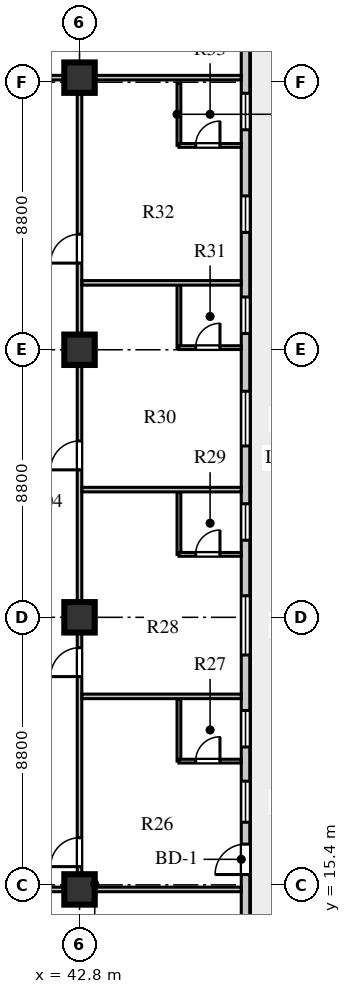
"""IFC4 building model, lengths in metres.
Left out: names, types, materials, properties, quantities, classifications, styles, units other than length and angle.
Written with IfcOpenShell. Run it as: python <this file> out.ifc"""

import sys

from ifc_helpers import new_model, si_unit, direction, frame, frame_2d, origin, origin_2d, place, context, subcontext, project, spatial, rectangle, extrude, element, fill, save


model = new_model("IFC4")
c1 = context("Model", 3, precision=1e-05, world=origin(), true_north=direction((0.0, 1.0)))
c2 = subcontext(c1, "Body", "Model", "MODEL_VIEW")
j1 = project(units=[si_unit("LENGTHUNIT", "METRE"), si_unit("PLANEANGLEUNIT", "RADIAN")], contexts=[c1])
p1 = place(None, origin())
s1 = spatial("IfcSite", under=j1, at=p1, CompositionType="ELEMENT")
p2 = place(p1, origin())
s2 = spatial("IfcBuilding", under=s1, at=p2, CompositionType="ELEMENT")
p3 = place(p2, frame((0.0, 0.0, 127.1)))
s3 = spatial("IfcBuildingStorey", under=s2, at=p3, CompositionType="ELEMENT", Elevation=127.1)
for number, where, z_axis, x_axis in (
    (1, (42.8, 15.25, 0.0), (0.0, 0.0, 1.0), (1.0, 0.0, 0.0)),
    (2, (42.8, 24.2, 0.0), (0.0, 0.0, 1.0), (1.0, 0.0, 0.0)),
    (3, (42.8, 33.0, 0.0), (0.0, 0.0, 1.0), (1.0, 0.0, 0.0)),
    (4, (42.8, 41.95, 0.0), (0.0, 0.0, 1.0), (1.0, 0.0, 0.0)),
):
    element("IfcColumn", number, at=place(p3, frame(where, z_axis=z_axis, x_axis=x_axis)), inside=s3, PredefinedType="COLUMN", context=c2, shape_type="SweptSolid", body=[
        extrude(rectangle(XDim=1.0, YDim=1.0, at=origin_2d()), origin(), (0.0, 0.0, 1.0), 3.6),
    ])
p4 = place(p3, frame((48.26, 13.33, 0.0), z_axis=(0.0, 0.0, 1.0), x_axis=(0.0, 1.0, 0.0)))
e5 = element("IfcWall", 5, at=p4, inside=s3, PredefinedType="STANDARD", context=c2, shape_type="SweptSolid", body=[
    extrude(rectangle(XDim=30.54, YDim=0.28, at=frame_2d((15.27, 0.0))), origin(), (0.0, 0.0, 1.0), 3.6),
])
p5 = place(p4, frame((2.41, 0.0, 0.0)))
e6 = element("IfcOpeningElement", 6, at=p5, cuts=e5, PredefinedType="OPENING", context=c2, shape_type="SweptSolid", body=[
    extrude(rectangle(XDim=1.0, YDim=2.05, at=frame_2d((0.5, 1.025))), frame((0.0, 0.15, 0.0), z_axis=(0.0, -1.0, 0.0), x_axis=(1.0, 0.0, 0.0)), (0.0, 0.0, 1.0), 0.3),
])
p6 = place(p4, frame((4.13, 0.0, 0.8)))
e7 = element("IfcOpeningElement", 7, at=p6, cuts=e5, PredefinedType="OPENING", context=c2, shape_type="SweptSolid", body=[
    extrude(rectangle(XDim=1.35, YDim=1.9, at=frame_2d((0.675, 0.95))), frame((0.0, 0.15, 0.0), z_axis=(0.0, -1.0, 0.0), x_axis=(1.0, 0.0, 0.0)), (0.0, 0.0, 1.0), 0.3),
])
p7 = place(p4, frame((6.605, 0.0, 0.8)))
e8 = element("IfcOpeningElement", 8, at=p7, cuts=e5, PredefinedType="OPENING", context=c2, shape_type="SweptSolid", body=[
    extrude(rectangle(XDim=1.2, YDim=1.75, at=frame_2d((0.6, 0.875))), frame((0.0, 0.15, 0.0), z_axis=(0.0, -1.0, 0.0), x_axis=(1.0, 0.0, 0.0)), (0.0, 0.0, 1.0), 0.3),
])
p8 = place(p4, frame((9.63, 0.0, 0.8)))
e9 = element("IfcOpeningElement", 9, at=p8, cuts=e5, PredefinedType="OPENING", context=c2, shape_type="SweptSolid", body=[
    extrude(rectangle(XDim=1.95, YDim=2.0, at=frame_2d((0.975, 1.0))), frame((0.0, 0.15, 0.0), z_axis=(0.0, -1.0, 0.0), x_axis=(1.0, 0.0, 0.0)), (0.0, 0.0, 1.0), 0.3),
])
p9 = place(p4, frame((13.405, 0.0, 0.8)))
e10 = element("IfcOpeningElement", 10, at=p9, cuts=e5, PredefinedType="OPENING", context=c2, shape_type="SweptSolid", body=[
    extrude(rectangle(XDim=1.2, YDim=1.75, at=frame_2d((0.6, 0.875))), frame((0.0, 0.15, 0.0), z_axis=(0.0, -1.0, 0.0), x_axis=(1.0, 0.0, 0.0)), (0.0, 0.0, 1.0), 0.3),
])
p10 = place(p4, frame((16.505, 0.0, 0.8)))
e11 = element("IfcOpeningElement", 11, at=p10, cuts=e5, PredefinedType="OPENING", context=c2, shape_type="SweptSolid", body=[
    extrude(rectangle(XDim=1.8, YDim=2.0, at=frame_2d((0.9, 1.0))), frame((0.0, 0.15, 0.0), z_axis=(0.0, -1.0, 0.0), x_axis=(1.0, 0.0, 0.0)), (0.0, 0.0, 1.0), 0.3),
])
p11 = place(p4, frame((20.205, 0.0, 0.8)))
e12 = element("IfcOpeningElement", 12, at=p11, cuts=e5, PredefinedType="OPENING", context=c2, shape_type="SweptSolid", body=[
    extrude(rectangle(XDim=1.2, YDim=1.75, at=frame_2d((0.6, 0.875))), frame((0.0, 0.15, 0.0), z_axis=(0.0, -1.0, 0.0), x_axis=(1.0, 0.0, 0.0)), (0.0, 0.0, 1.0), 0.3),
])
p12 = place(p4, frame((23.53, 0.0, 0.8)))
e13 = element("IfcOpeningElement", 13, at=p12, cuts=e5, PredefinedType="OPENING", context=c2, shape_type="SweptSolid", body=[
    extrude(rectangle(XDim=1.2, YDim=1.75, at=frame_2d((0.6, 0.875))), frame((0.0, 0.15, 0.0), z_axis=(0.0, -1.0, 0.0), x_axis=(1.0, 0.0, 0.0)), (0.0, 0.0, 1.0), 0.3),
])
p13 = place(p4, frame((26.905, 0.0, 0.8)))
e14 = element("IfcOpeningElement", 14, at=p13, cuts=e5, PredefinedType="OPENING", context=c2, shape_type="SweptSolid", body=[
    extrude(rectangle(XDim=1.2, YDim=1.75, at=frame_2d((0.6, 0.875))), frame((0.0, 0.15, 0.0), z_axis=(0.0, -1.0, 0.0), x_axis=(1.0, 0.0, 0.0)), (0.0, 0.0, 1.0), 0.3),
])
p14 = place(p3, frame((42.8, 15.25, 0.0), z_axis=(0.0, 0.0, 1.0), x_axis=(0.0, 1.0, 0.0)))
e15 = element("IfcWall", 15, at=p14, inside=s3, PredefinedType="PARTITIONING", context=c2, shape_type="SweptSolid", body=[
    extrude(rectangle(XDim=26.7, YDim=0.15, at=frame_2d((13.35, 0.0))), origin(), (0.0, 0.0, 1.0), 2.95),
])
p15 = place(p14, frame((0.75, 0.0, 0.0)))
e16 = element("IfcOpeningElement", 16, at=p15, cuts=e15, PredefinedType="OPENING", context=c2, shape_type="SweptSolid", body=[
    extrude(rectangle(XDim=0.95, YDim=2.1, at=frame_2d((0.475, 1.05))), frame((0.0, 0.085, 0.0), z_axis=(0.0, -1.0, 0.0), x_axis=(1.0, 0.0, 0.0)), (0.0, 0.0, 1.0), 0.17),
])
p16 = place(p14, frame((7.0, 0.0, 0.0)))
e17 = element("IfcOpeningElement", 17, at=p16, cuts=e15, PredefinedType="OPENING", context=c2, shape_type="SweptSolid", body=[
    extrude(rectangle(XDim=0.95, YDim=2.1, at=frame_2d((0.475, 1.05))), frame((0.0, 0.085, 0.0), z_axis=(0.0, -1.0, 0.0), x_axis=(1.0, 0.0, 0.0)), (0.0, 0.0, 1.0), 0.17),
])
p17 = place(p14, frame((13.8, 0.0, 0.0)))
e18 = element("IfcOpeningElement", 18, at=p17, cuts=e15, PredefinedType="OPENING", context=c2, shape_type="SweptSolid", body=[
    extrude(rectangle(XDim=0.95, YDim=2.1, at=frame_2d((0.475, 1.05))), frame((0.0, 0.085, 0.0), z_axis=(0.0, -1.0, 0.0), x_axis=(1.0, 0.0, 0.0)), (0.0, 0.0, 1.0), 0.17),
])
p18 = place(p14, frame((20.6, 0.0, 0.0)))
e19 = element("IfcOpeningElement", 19, at=p18, cuts=e15, PredefinedType="OPENING", context=c2, shape_type="SweptSolid", body=[
    extrude(rectangle(XDim=0.95, YDim=2.1, at=frame_2d((0.475, 1.05))), frame((0.0, 0.085, 0.0), z_axis=(0.0, -1.0, 0.0), x_axis=(1.0, 0.0, 0.0)), (0.0, 0.0, 1.0), 0.17),
])
for number, where, z_axis, x_axis in (
    (20, (40.82, 15.25, 0.0), (0.0, 0.0, 1.0), (1.0, 0.0, 0.0)),
    (21, (40.82, 41.95, 0.0), (0.0, 0.0, 1.0), (1.0, 0.0, 0.0)),
):
    element("IfcWall", number, at=place(p3, frame(where, z_axis=z_axis, x_axis=x_axis)), inside=s3, PredefinedType="PARTITIONING", context=c2, shape_type="SweptSolid", body=[
        extrude(rectangle(XDim=7.3, YDim=0.15, at=frame_2d((3.65, 0.0))), origin(), (0.0, 0.0, 1.0), 2.95),
    ])
p19 = place(p3, frame((46.07, 19.47, 0.0), z_axis=(0.0, 0.0, 1.0), x_axis=(0.0, 1.0, 0.0)))
e22 = element("IfcWall", 22, at=p19, inside=s3, PredefinedType="PLUMBINGWALL", context=c2, shape_type="SweptSolid", body=[
    extrude(rectangle(XDim=2.05, YDim=0.125, at=frame_2d((1.025, 0.0))), origin(), (0.0, 0.0, 1.0), 3.6),
])
p20 = place(p3, frame((46.07, 19.47, 0.0), z_axis=(0.0, 0.0, 1.0), x_axis=(1.0, 0.0, 0.0)))
e23 = element("IfcWall", 23, at=p20, inside=s3, PredefinedType="PLUMBINGWALL", context=c2, shape_type="SweptSolid", body=[
    extrude(rectangle(XDim=2.05, YDim=0.125, at=frame_2d((1.025, 0.0))), origin(), (0.0, 0.0, 1.0), 3.6),
])
p21 = place(p20, frame((0.55, 0.0, 0.0)))
e24 = element("IfcOpeningElement", 24, at=p21, cuts=e23, PredefinedType="OPENING", context=c2, shape_type="SweptSolid", body=[
    extrude(rectangle(XDim=0.8, YDim=2.05, at=frame_2d((0.4, 1.025))), frame((0.0, 0.073, 0.0), z_axis=(0.0, -1.0, 0.0), x_axis=(1.0, 0.0, 0.0)), (0.0, 0.0, 1.0), 0.145),
])
p22 = place(p3, frame((42.88, 21.6, 0.0), z_axis=(0.0, 0.0, 1.0), x_axis=(1.0, 0.0, 0.0)))
e25 = element("IfcWall", 25, at=p22, inside=s3, PredefinedType="PARTITIONING", context=c2, shape_type="SweptSolid", body=[
    extrude(rectangle(XDim=5.24, YDim=0.15, at=frame_2d((2.62, 0.0))), origin(), (0.0, 0.0, 1.0), 3.6),
])
p23 = place(p3, frame((46.07, 26.27, 0.0), z_axis=(0.0, 0.0, 1.0), x_axis=(0.0, 1.0, 0.0)))
e26 = element("IfcWall", 26, at=p23, inside=s3, PredefinedType="PLUMBINGWALL", context=c2, shape_type="SweptSolid", body=[
    extrude(rectangle(XDim=2.05, YDim=0.125, at=frame_2d((1.025, 0.0))), origin(), (0.0, 0.0, 1.0), 3.6),
])
p24 = place(p3, frame((46.07, 26.27, 0.0), z_axis=(0.0, 0.0, 1.0), x_axis=(1.0, 0.0, 0.0)))
e27 = element("IfcWall", 27, at=p24, inside=s3, PredefinedType="PLUMBINGWALL", context=c2, shape_type="SweptSolid", body=[
    extrude(rectangle(XDim=2.05, YDim=0.125, at=frame_2d((1.025, 0.0))), origin(), (0.0, 0.0, 1.0), 3.6),
])
p25 = place(p24, frame((0.55, 0.0, 0.0)))
e28 = element("IfcOpeningElement", 28, at=p25, cuts=e27, PredefinedType="OPENING", context=c2, shape_type="SweptSolid", body=[
    extrude(rectangle(XDim=0.8, YDim=2.05, at=frame_2d((0.4, 1.025))), frame((0.0, 0.073, 0.0), z_axis=(0.0, -1.0, 0.0), x_axis=(1.0, 0.0, 0.0)), (0.0, 0.0, 1.0), 0.145),
])
p26 = place(p3, frame((42.88, 28.4, 0.0), z_axis=(0.0, 0.0, 1.0), x_axis=(1.0, 0.0, 0.0)))
e29 = element("IfcWall", 29, at=p26, inside=s3, PredefinedType="PARTITIONING", context=c2, shape_type="SweptSolid", body=[
    extrude(rectangle(XDim=5.24, YDim=0.15, at=frame_2d((2.62, 0.0))), origin(), (0.0, 0.0, 1.0), 3.6),
])
p27 = place(p3, frame((46.07, 33.07, 0.0), z_axis=(0.0, 0.0, 1.0), x_axis=(0.0, 1.0, 0.0)))
e30 = element("IfcWall", 30, at=p27, inside=s3, PredefinedType="PLUMBINGWALL", context=c2, shape_type="SweptSolid", body=[
    extrude(rectangle(XDim=2.05, YDim=0.125, at=frame_2d((1.025, 0.0))), origin(), (0.0, 0.0, 1.0), 3.6),
])
p28 = place(p3, frame((46.07, 33.07, 0.0), z_axis=(0.0, 0.0, 1.0), x_axis=(1.0, 0.0, 0.0)))
e31 = element("IfcWall", 31, at=p28, inside=s3, PredefinedType="PLUMBINGWALL", context=c2, shape_type="SweptSolid", body=[
    extrude(rectangle(XDim=2.05, YDim=0.125, at=frame_2d((1.025, 0.0))), origin(), (0.0, 0.0, 1.0), 3.1),
])
p29 = place(p28, frame((0.55, 0.0, 0.0)))
e32 = element("IfcOpeningElement", 32, at=p29, cuts=e31, PredefinedType="OPENING", context=c2, shape_type="SweptSolid", body=[
    extrude(rectangle(XDim=0.8, YDim=2.05, at=frame_2d((0.4, 1.025))), frame((0.0, 0.073, 0.0), z_axis=(0.0, -1.0, 0.0), x_axis=(1.0, 0.0, 0.0)), (0.0, 0.0, 1.0), 0.145),
])
p30 = place(p3, frame((42.88, 35.2, 0.0), z_axis=(0.0, 0.0, 1.0), x_axis=(1.0, 0.0, 0.0)))
e33 = element("IfcWall", 33, at=p30, inside=s3, PredefinedType="PARTITIONING", context=c2, shape_type="SweptSolid", body=[
    extrude(rectangle(XDim=5.24, YDim=0.15, at=frame_2d((2.62, 0.0))), origin(), (0.0, 0.0, 1.0), 3.6),
])
p31 = place(p3, frame((46.07, 39.72, 0.0), z_axis=(0.0, 0.0, 1.0), x_axis=(0.0, 1.0, 0.0)))
e34 = element("IfcWall", 34, at=p31, inside=s3, PredefinedType="PLUMBINGWALL", context=c2, shape_type="SweptSolid", body=[
    extrude(rectangle(XDim=2.05, YDim=0.125, at=frame_2d((1.025, 0.0))), origin(), (0.0, 0.0, 1.0), 3.6),
])
p32 = place(p3, frame((46.07, 39.72, 0.0), z_axis=(0.0, 0.0, 1.0), x_axis=(1.0, 0.0, 0.0)))
e35 = element("IfcWall", 35, at=p32, inside=s3, PredefinedType="PLUMBINGWALL", context=c2, shape_type="SweptSolid", body=[
    extrude(rectangle(XDim=2.05, YDim=0.125, at=frame_2d((1.025, 0.0))), origin(), (0.0, 0.0, 1.0), 3.6),
])
p33 = place(p32, frame((0.55, 0.0, 0.0)))
e36 = element("IfcOpeningElement", 36, at=p33, cuts=e35, PredefinedType="OPENING", context=c2, shape_type="SweptSolid", body=[
    extrude(rectangle(XDim=0.8, YDim=2.05, at=frame_2d((0.4, 1.025))), frame((0.0, 0.073, 0.0), z_axis=(0.0, -1.0, 0.0), x_axis=(1.0, 0.0, 0.0)), (0.0, 0.0, 1.0), 0.145),
])
p34 = place(p5, frame((1.0, 0.0, 0.0), z_axis=(0.0, 0.0, 1.0), x_axis=(-1.0, 0.0, 0.0)))
e37 = element("IfcDoor", 37, at=p34, inside=s3, OperationType="SINGLE_SWING_RIGHT", PredefinedType="DOOR", context=c2, shape_type="SweptSolid", body=[
    extrude(rectangle(XDim=1.0, YDim=2.05, at=frame_2d((0.5, 1.025))), frame((0.0, 0.025, 0.0), z_axis=(0.0, -1.0, 0.0), x_axis=(1.0, 0.0, 0.0)), (0.0, 0.0, 1.0), 0.05),
])
fill(e6, e37)
p35 = place(p6, origin())
e38 = element("IfcWindow", 38, at=p35, inside=s3, PartitioningType="SINGLE_PANEL", PredefinedType="WINDOW", context=c2, shape_type="SweptSolid", body=[
    extrude(rectangle(XDim=1.35, YDim=1.9, at=frame_2d((0.675, 0.95))), frame((0.0, 0.03, 0.0), z_axis=(0.0, -1.0, 0.0), x_axis=(1.0, 0.0, 0.0)), (0.0, 0.0, 1.0), 0.06),
])
fill(e7, e38)
p36 = place(p7, origin())
e39 = element("IfcWindow", 39, at=p36, inside=s3, PartitioningType="SINGLE_PANEL", PredefinedType="WINDOW", context=c2, shape_type="SweptSolid", body=[
    extrude(rectangle(XDim=1.2, YDim=1.75, at=frame_2d((0.6, 0.875))), frame((0.0, 0.03, 0.0), z_axis=(0.0, -1.0, 0.0), x_axis=(1.0, 0.0, 0.0)), (0.0, 0.0, 1.0), 0.06),
])
fill(e8, e39)
p37 = place(p8, origin())
e40 = element("IfcWindow", 40, at=p37, inside=s3, PartitioningType="SINGLE_PANEL", PredefinedType="WINDOW", context=c2, shape_type="SweptSolid", body=[
    extrude(rectangle(XDim=1.95, YDim=2.0, at=frame_2d((0.975, 1.0))), frame((0.0, 0.03, 0.0), z_axis=(0.0, -1.0, 0.0), x_axis=(1.0, 0.0, 0.0)), (0.0, 0.0, 1.0), 0.06),
])
fill(e9, e40)
p38 = place(p9, origin())
e41 = element("IfcWindow", 41, at=p38, inside=s3, PartitioningType="SINGLE_PANEL", PredefinedType="WINDOW", context=c2, shape_type="SweptSolid", body=[
    extrude(rectangle(XDim=1.2, YDim=1.75, at=frame_2d((0.6, 0.875))), frame((0.0, 0.03, 0.0), z_axis=(0.0, -1.0, 0.0), x_axis=(1.0, 0.0, 0.0)), (0.0, 0.0, 1.0), 0.06),
])
fill(e10, e41)
p39 = place(p10, origin())
e42 = element("IfcWindow", 42, at=p39, inside=s3, PartitioningType="SINGLE_PANEL", PredefinedType="WINDOW", context=c2, shape_type="SweptSolid", body=[
    extrude(rectangle(XDim=1.8, YDim=2.0, at=frame_2d((0.9, 1.0))), frame((0.0, 0.03, 0.0), z_axis=(0.0, -1.0, 0.0), x_axis=(1.0, 0.0, 0.0)), (0.0, 0.0, 1.0), 0.06),
])
fill(e11, e42)
p40 = place(p11, origin())
e43 = element("IfcWindow", 43, at=p40, inside=s3, PartitioningType="SINGLE_PANEL", PredefinedType="WINDOW", context=c2, shape_type="SweptSolid", body=[
    extrude(rectangle(XDim=1.2, YDim=1.75, at=frame_2d((0.6, 0.875))), frame((0.0, 0.03, 0.0), z_axis=(0.0, -1.0, 0.0), x_axis=(1.0, 0.0, 0.0)), (0.0, 0.0, 1.0), 0.06),
])
fill(e12, e43)
p41 = place(p12, origin())
e44 = element("IfcWindow", 44, at=p41, inside=s3, PartitioningType="SINGLE_PANEL", PredefinedType="WINDOW", context=c2, shape_type="SweptSolid", body=[
    extrude(rectangle(XDim=1.2, YDim=1.75, at=frame_2d((0.6, 0.875))), frame((0.0, 0.03, 0.0), z_axis=(0.0, -1.0, 0.0), x_axis=(1.0, 0.0, 0.0)), (0.0, 0.0, 1.0), 0.06),
])
fill(e13, e44)
p42 = place(p13, origin())
e45 = element("IfcWindow", 45, at=p42, inside=s3, PartitioningType="SINGLE_PANEL", PredefinedType="WINDOW", context=c2, shape_type="SweptSolid", body=[
    extrude(rectangle(XDim=1.2, YDim=1.75, at=frame_2d((0.6, 0.875))), frame((0.0, 0.03, 0.0), z_axis=(0.0, -1.0, 0.0), x_axis=(1.0, 0.0, 0.0)), (0.0, 0.0, 1.0), 0.06),
])
fill(e14, e45)
p43 = place(p15, origin())
e46 = element("IfcDoor", 46, at=p43, inside=s3, OperationType="SINGLE_SWING_LEFT", PredefinedType="DOOR", context=c2, shape_type="SweptSolid", body=[
    extrude(rectangle(XDim=0.95, YDim=2.1, at=frame_2d((0.475, 1.05))), frame((0.0, 0.025, 0.0), z_axis=(0.0, -1.0, 0.0), x_axis=(1.0, 0.0, 0.0)), (0.0, 0.0, 1.0), 0.05),
])
fill(e16, e46)
p44 = place(p21, frame((0.8, 0.0, 0.0), z_axis=(0.0, 0.0, 1.0), x_axis=(-1.0, 0.0, 0.0)))
e47 = element("IfcDoor", 47, at=p44, inside=s3, OperationType="SINGLE_SWING_LEFT", PredefinedType="DOOR", context=c2, shape_type="SweptSolid", body=[
    extrude(rectangle(XDim=0.8, YDim=2.05, at=frame_2d((0.4, 1.025))), frame((0.0, 0.025, 0.0), z_axis=(0.0, -1.0, 0.0), x_axis=(1.0, 0.0, 0.0)), (0.0, 0.0, 1.0), 0.05),
])
fill(e24, e47)
p45 = place(p16, origin())
e48 = element("IfcDoor", 48, at=p45, inside=s3, OperationType="SINGLE_SWING_LEFT", PredefinedType="DOOR", context=c2, shape_type="SweptSolid", body=[
    extrude(rectangle(XDim=0.95, YDim=2.1, at=frame_2d((0.475, 1.05))), frame((0.0, 0.025, 0.0), z_axis=(0.0, -1.0, 0.0), x_axis=(1.0, 0.0, 0.0)), (0.0, 0.0, 1.0), 0.05),
])
fill(e17, e48)
p46 = place(p25, frame((0.8, 0.0, 0.0), z_axis=(0.0, 0.0, 1.0), x_axis=(-1.0, 0.0, 0.0)))
e49 = element("IfcDoor", 49, at=p46, inside=s3, OperationType="SINGLE_SWING_LEFT", PredefinedType="DOOR", context=c2, shape_type="SweptSolid", body=[
    extrude(rectangle(XDim=0.8, YDim=2.05, at=frame_2d((0.4, 1.025))), frame((0.0, 0.025, 0.0), z_axis=(0.0, -1.0, 0.0), x_axis=(1.0, 0.0, 0.0)), (0.0, 0.0, 1.0), 0.05),
])
fill(e28, e49)
p47 = place(p17, origin())
e50 = element("IfcDoor", 50, at=p47, inside=s3, OperationType="SINGLE_SWING_LEFT", PredefinedType="DOOR", context=c2, shape_type="SweptSolid", body=[
    extrude(rectangle(XDim=0.95, YDim=2.1, at=frame_2d((0.475, 1.05))), frame((0.0, 0.025, 0.0), z_axis=(0.0, -1.0, 0.0), x_axis=(1.0, 0.0, 0.0)), (0.0, 0.0, 1.0), 0.05),
])
fill(e18, e50)
p48 = place(p29, frame((0.8, 0.0, 0.0), z_axis=(0.0, 0.0, 1.0), x_axis=(-1.0, 0.0, 0.0)))
e51 = element("IfcDoor", 51, at=p48, inside=s3, OperationType="SINGLE_SWING_LEFT", PredefinedType="DOOR", context=c2, shape_type="SweptSolid", body=[
    extrude(rectangle(XDim=0.8, YDim=2.05, at=frame_2d((0.4, 1.025))), frame((0.0, 0.025, 0.0), z_axis=(0.0, -1.0, 0.0), x_axis=(1.0, 0.0, 0.0)), (0.0, 0.0, 1.0), 0.05),
])
fill(e32, e51)
p49 = place(p18, origin())
e52 = element("IfcDoor", 52, at=p49, inside=s3, OperationType="SINGLE_SWING_LEFT", PredefinedType="DOOR", context=c2, shape_type="SweptSolid", body=[
    extrude(rectangle(XDim=0.95, YDim=2.1, at=frame_2d((0.475, 1.05))), frame((0.0, 0.025, 0.0), z_axis=(0.0, -1.0, 0.0), x_axis=(1.0, 0.0, 0.0)), (0.0, 0.0, 1.0), 0.05),
])
fill(e19, e52)
p50 = place(p33, frame((0.8, 0.0, 0.0), z_axis=(0.0, 0.0, 1.0), x_axis=(-1.0, 0.0, 0.0)))
e53 = element("IfcDoor", 53, at=p50, inside=s3, OperationType="SINGLE_SWING_LEFT", PredefinedType="DOOR", context=c2, shape_type="SweptSolid", body=[
    extrude(rectangle(XDim=0.8, YDim=2.05, at=frame_2d((0.4, 1.025))), frame((0.0, 0.025, 0.0), z_axis=(0.0, -1.0, 0.0), x_axis=(1.0, 0.0, 0.0)), (0.0, 0.0, 1.0), 0.05),
])
fill(e36, e53)
save(model, sys.argv[1])
